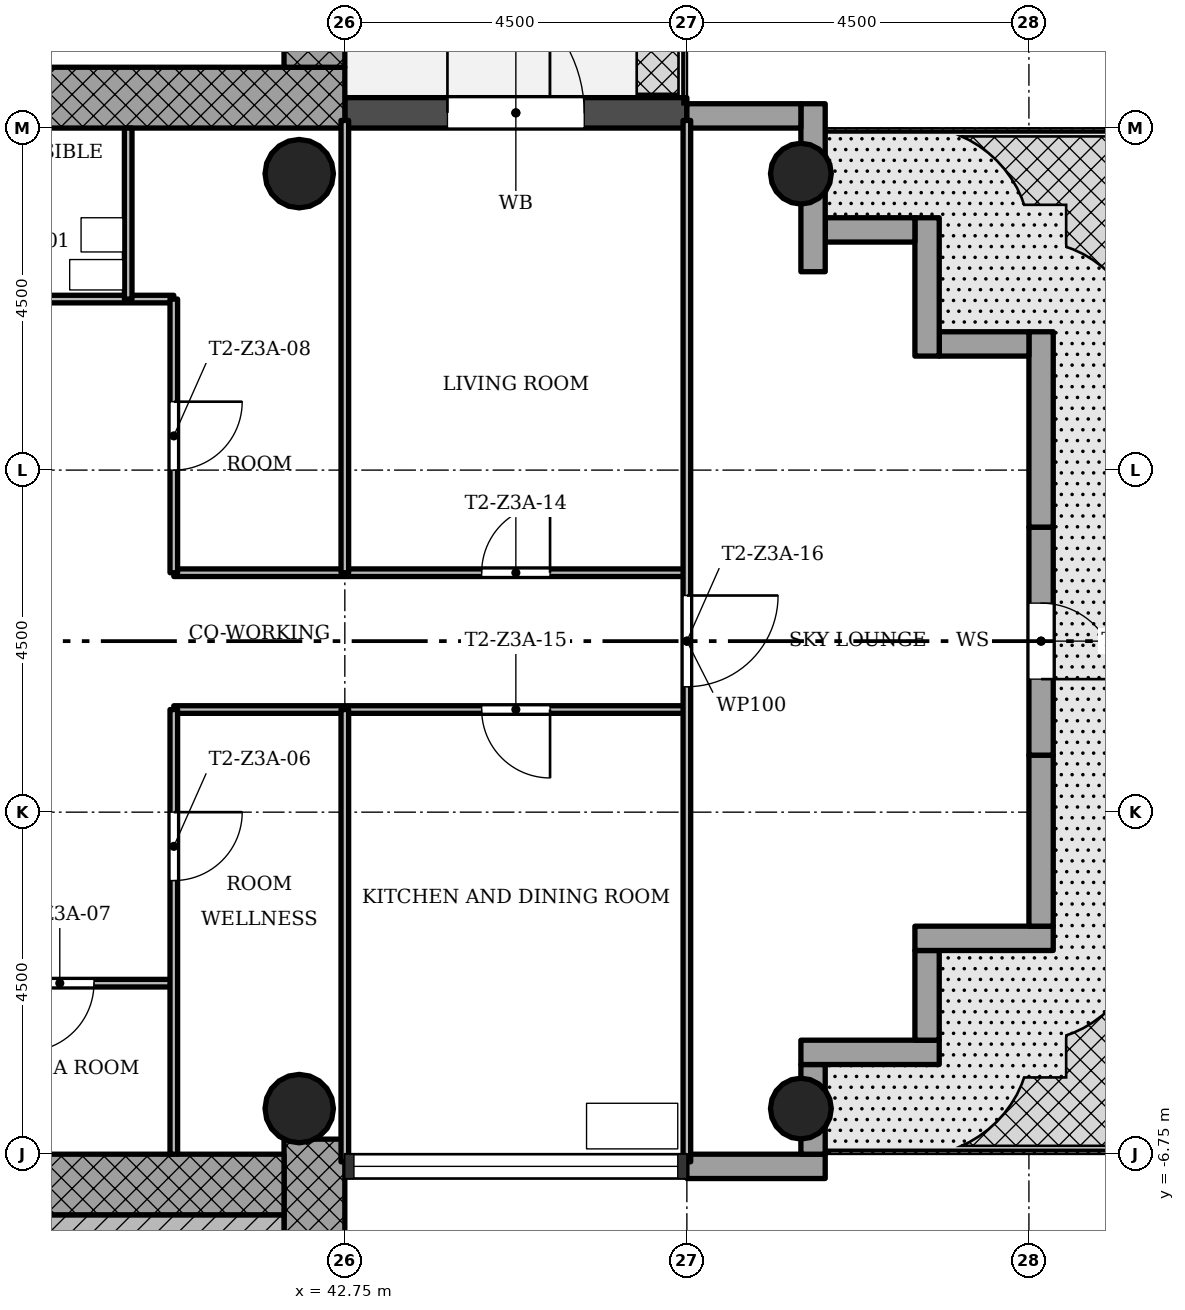
"""IFC4 building model, lengths in metres.
Left out: names, types, materials, properties, quantities, classifications, styles, units other than length and angle.
Written with IfcOpenShell. Run it as: python <this file> out.ifc"""

import sys

from ifc_helpers import new_model, si_unit, direction, frame, frame_2d, origin, origin_2d, place, context, subcontext, project, spatial, rectangle, hollow_circle, extrude, element, fill, save


model = new_model("IFC4")
c1 = context("Model", 3, precision=1e-05, world=origin(), true_north=direction((0.0, 1.0)))
c2 = subcontext(c1, "Body", "Model", "MODEL_VIEW")
j1 = project(units=[si_unit("LENGTHUNIT", "METRE"), si_unit("PLANEANGLEUNIT", "RADIAN")], contexts=[c1])
p1 = place(None, origin())
s1 = spatial("IfcSite", under=j1, at=p1, CompositionType="ELEMENT")
p2 = place(p1, origin())
s2 = spatial("IfcBuilding", under=s1, at=p2, CompositionType="ELEMENT")
p3 = place(p2, frame((0.0, 0.0, 133.7)))
s3 = spatial("IfcBuildingStorey", under=s2, at=p3, CompositionType="ELEMENT", Elevation=133.7)
p4 = place(p3, frame((30.05, 7.15, 0.0), z_axis=(0.0, 0.0, 1.0), x_axis=(1.0, 0.0, 0.0)))
e1 = element("IfcWall", 1, at=p4, inside=s3, PredefinedType="SHEAR", context=c2, shape_type="SweptSolid", body=[
    extrude(rectangle(XDim=12.7, YDim=0.8, at=frame_2d((6.35, 0.0))), origin(), (0.0, 0.0, 1.0), 3.4),
])
p5 = place(p4, frame((5.05, 0.0, 0.0)))
e2 = element("IfcOpeningElement", 2, at=p5, cuts=e1, PredefinedType="OPENING", context=c2, shape_type="SweptSolid", body=[
    extrude(rectangle(XDim=1.8, YDim=2.1, at=frame_2d((0.9, 1.05))), frame((0.0, 0.41, 0.0), z_axis=(0.0, -1.0, 0.0), x_axis=(1.0, 0.0, 0.0)), (0.0, 0.0, 1.0), 0.82),
])
p6 = place(p3, frame((42.35, 7.55, 0.0), z_axis=(0.0, 0.0, 1.0), x_axis=(0.0, 1.0, 0.0)))
e3 = element("IfcWall", 3, at=p6, inside=s3, PredefinedType="SHEAR", context=c2, shape_type="SweptSolid", body=[
    extrude(rectangle(XDim=8.2, YDim=0.8, at=frame_2d((4.1, 0.0))), origin(), (0.0, 0.0, 1.0), 3.4),
])
p7 = place(p3, frame((42.35, -14.95, 0.0), z_axis=(0.0, 0.0, 1.0), x_axis=(0.0, 1.0, 0.0)))
e4 = element("IfcWall", 4, at=p7, inside=s3, PredefinedType="SHEAR", context=c2, shape_type="SweptSolid", body=[
    extrude(rectangle(XDim=8.398, YDim=0.8, at=frame_2d((4.199, 0.0))), origin(), (0.0, 0.0, 1.0), 3.4),
])
p8 = place(p3, frame((41.95, -7.15, 0.0), z_axis=(0.0, 0.0, 1.0), x_axis=(-1.0, 0.0, 0.0)))
e5 = element("IfcWall", 5, at=p8, inside=s3, PredefinedType="SHEAR", context=c2, shape_type="SweptSolid", body=[
    extrude(rectangle(XDim=12.7, YDim=0.8, at=frame_2d((6.35, 0.0))), origin(), (0.0, 0.0, 1.0), 3.4),
])
p9 = place(p8, frame((5.05, 0.0, 0.0)))
e6 = element("IfcOpeningElement", 6, at=p9, cuts=e5, PredefinedType="OPENING", context=c2, shape_type="SweptSolid", body=[
    extrude(rectangle(XDim=1.8, YDim=2.1, at=frame_2d((0.9, 1.05))), frame((0.0, 0.41, 0.0), z_axis=(0.0, -1.0, 0.0), x_axis=(1.0, 0.0, 0.0)), (0.0, 0.0, 1.0), 0.82),
])
for number, where, z_axis, x_axis in (
    (7, (48.75, -6.15, 0.0), (0.0, 0.0, 1.0), (1.0, 0.0, 0.0)),
    (8, (48.75, 6.15, 0.0), (0.0, 0.0, 1.0), (1.0, 0.0, 0.0)),
):
    element("IfcColumn", number, at=place(p3, frame(where, z_axis=z_axis, x_axis=x_axis)), inside=s3, PredefinedType="COLUMN", context=c2, shape_type="SweptSolid", body=[
        extrude(hollow_circle(Radius=0.4, WallThickness=0.028, at=origin_2d()), origin(), (0.0, 0.0, 1.0), 3.4),
    ])
for number, where, z_axis, x_axis in (
    (9, (42.15, -6.15, 0.0), (0.0, 0.0, 1.0), (1.0, 0.0, 0.0)),
    (10, (42.15, 6.15, 0.0), (0.0, 0.0, 1.0), (1.0, 0.0, 0.0)),
):
    element("IfcColumn", number, at=place(p3, frame(where, z_axis=z_axis, x_axis=x_axis)), inside=s3, PredefinedType="COLUMN", context=c2, shape_type="SweptSolid", body=[
        extrude(hollow_circle(Radius=0.45, WallThickness=0.032, at=origin_2d()), origin(), (0.0, 0.0, 1.0), 3.4),
    ])
p10 = place(p3, frame((47.25, -6.91, 0.0), z_axis=(0.0, 0.0, 1.0), x_axis=(1.0, 0.0, 0.0)))
e11 = element("IfcWall", 11, at=p10, inside=s3, PredefinedType="STANDARD", context=c2, shape_type="SweptSolid", body=[
    extrude(rectangle(XDim=1.82, YDim=0.32, at=frame_2d((0.91, 0.0))), origin(), (0.0, 0.0, 1.0), 3.1),
])
p11 = place(p3, frame((48.91, -6.75, -0.02), z_axis=(0.0, 0.0, 1.0), x_axis=(0.0, 1.0, 0.0)))
e12 = element("IfcWall", 12, at=p11, inside=s3, PredefinedType="STANDARD", context=c2, shape_type="SweptSolid", body=[
    extrude(rectangle(XDim=1.18, YDim=0.32, at=frame_2d((0.59, 0.0))), origin(), (0.0, 0.0, 1.0), 3.12),
])
p12 = place(p3, frame((48.75, -5.41, -0.02), z_axis=(0.0, 0.0, 1.0), x_axis=(1.0, 0.0, 0.0)))
e13 = element("IfcWall", 13, at=p12, inside=s3, PredefinedType="STANDARD", context=c2, shape_type="SweptSolid", body=[
    extrude(rectangle(XDim=1.82, YDim=0.32, at=frame_2d((0.91, 0.0))), origin(), (0.0, 0.0, 1.0), 3.12),
])
p13 = place(p3, frame((50.41, -5.25, -0.02), z_axis=(0.0, 0.0, 1.0), x_axis=(0.0, 1.0, 0.0)))
e14 = element("IfcWall", 14, at=p13, inside=s3, PredefinedType="STANDARD", context=c2, shape_type="SweptSolid", body=[
    extrude(rectangle(XDim=1.18, YDim=0.32, at=frame_2d((0.59, 0.0))), origin(), (0.0, 0.0, 1.0), 3.12),
])
p14 = place(p3, frame((50.25, -3.91, -0.02), z_axis=(0.0, 0.0, 1.0), x_axis=(1.0, 0.0, 0.0)))
e15 = element("IfcWall", 15, at=p14, inside=s3, PredefinedType="STANDARD", context=c2, shape_type="SweptSolid", body=[
    extrude(rectangle(XDim=1.82, YDim=0.32, at=frame_2d((0.91, 0.0))), origin(), (0.0, 0.0, 1.0), 3.12),
])
p15 = place(p3, frame((51.91, -3.75, -0.02), z_axis=(0.0, 0.0, 1.0), x_axis=(0.0, 1.0, 0.0)))
e16 = element("IfcWall", 16, at=p15, inside=s3, PredefinedType="STANDARD", context=c2, shape_type="SweptSolid", body=[
    extrude(rectangle(XDim=2.25, YDim=0.32, at=frame_2d((1.125, 0.0))), origin(), (0.0, 0.0, 1.0), 3.12),
])
p16 = place(p3, frame((51.91, -1.5, -0.02), z_axis=(0.0, 0.0, 1.0), x_axis=(0.0, 1.0, 0.0)))
e17 = element("IfcWall", 17, at=p16, inside=s3, PredefinedType="STANDARD", context=c2, shape_type="SweptSolid", body=[
    extrude(rectangle(XDim=3.0, YDim=0.32, at=frame_2d((1.5, 0.0))), origin(), (0.0, 0.0, 1.0), 3.12),
])
p17 = place(p16, frame((1.0, 0.0, 0.02)))
e18 = element("IfcOpeningElement", 18, at=p17, cuts=e17, PredefinedType="OPENING", context=c2, shape_type="SweptSolid", body=[
    extrude(rectangle(XDim=1.0, YDim=2.1, at=frame_2d((0.5, 1.05))), frame((0.0, 0.17, 0.0), z_axis=(0.0, -1.0, 0.0), x_axis=(1.0, 0.0, 0.0)), (0.0, 0.0, 1.0), 0.34),
])
p18 = place(p3, frame((51.91, 1.5, -0.02), z_axis=(0.0, 0.0, 1.0), x_axis=(0.0, 1.0, 0.0)))
e19 = element("IfcWall", 19, at=p18, inside=s3, PredefinedType="STANDARD", context=c2, shape_type="SweptSolid", body=[
    extrude(rectangle(XDim=2.57, YDim=0.32, at=frame_2d((1.285, 0.0))), origin(), (0.0, 0.0, 1.0), 3.12),
])
p19 = place(p3, frame((51.75, 3.91, -0.02), z_axis=(0.0, 0.0, 1.0), x_axis=(-1.0, 0.0, 0.0)))
e20 = element("IfcWall", 20, at=p19, inside=s3, PredefinedType="STANDARD", context=c2, shape_type="SweptSolid", body=[
    extrude(rectangle(XDim=1.18, YDim=0.32, at=frame_2d((0.59, 0.0))), origin(), (0.0, 0.0, 1.0), 3.12),
])
p20 = place(p3, frame((50.41, 3.75, -0.02), z_axis=(0.0, 0.0, 1.0), x_axis=(0.0, 1.0, 0.0)))
e21 = element("IfcWall", 21, at=p20, inside=s3, PredefinedType="STANDARD", context=c2, shape_type="SweptSolid", body=[
    extrude(rectangle(XDim=1.82, YDim=0.32, at=frame_2d((0.91, 0.0))), origin(), (0.0, 0.0, 1.0), 3.12),
])
p21 = place(p3, frame((50.25, 5.41, -0.02), z_axis=(0.0, 0.0, 1.0), x_axis=(-1.0, 0.0, 0.0)))
e22 = element("IfcWall", 22, at=p21, inside=s3, PredefinedType="STANDARD", context=c2, shape_type="SweptSolid", body=[
    extrude(rectangle(XDim=1.18, YDim=0.32, at=frame_2d((0.59, 0.0))), origin(), (0.0, 0.0, 1.0), 3.12),
])
p22 = place(p3, frame((48.91, 4.86, -0.02), z_axis=(0.0, 0.0, 1.0), x_axis=(0.0, 1.0, 0.0)))
e23 = element("IfcWall", 23, at=p22, inside=s3, PredefinedType="STANDARD", context=c2, shape_type="SweptSolid", body=[
    extrude(rectangle(XDim=2.21, YDim=0.32, at=frame_2d((1.105, 0.0))), origin(), (0.0, 0.0, 1.0), 3.12),
])
p23 = place(p3, frame((48.75, 6.91, 0.0), z_axis=(0.0, 0.0, 1.0), x_axis=(-1.0, 0.0, 0.0)))
e24 = element("IfcWall", 24, at=p23, inside=s3, PredefinedType="STANDARD", context=c2, shape_type="SweptSolid", body=[
    extrude(rectangle(XDim=1.5, YDim=0.32, at=frame_2d((0.75, 0.0))), origin(), (0.0, 0.0, 1.0), 3.1),
])
p24 = place(p3, frame((47.25, 6.95, -0.02), z_axis=(0.0, 0.0, 1.0), x_axis=(-1.0, 0.0, 0.0)))
e25 = element("IfcWall", 25, at=p24, inside=s3, PredefinedType="STANDARD", context=c2, shape_type="SweptSolid", body=[
    extrude(rectangle(XDim=4.5, YDim=0.4, at=frame_2d((2.25, 0.0))), origin(), (0.0, 0.0, 1.0), 3.12),
])
p25 = place(p24, frame((1.35, 0.0, 0.02)))
e26 = element("IfcOpeningElement", 26, at=p25, cuts=e25, PredefinedType="OPENING", context=c2, shape_type="SweptSolid", body=[
    extrude(rectangle(XDim=1.8, YDim=2.1, at=frame_2d((0.9, 1.05))), frame((0.0, 0.21, 0.0), z_axis=(0.0, -1.0, 0.0), x_axis=(1.0, 0.0, 0.0)), (0.0, 0.0, 1.0), 0.42),
])
p26 = place(p3, frame((40.5, -4.5, 0.0), z_axis=(0.0, 0.0, 1.0), x_axis=(-1.0, 0.0, 0.0)))
e27 = element("IfcWall", 27, at=p26, inside=s3, PredefinedType="PARTITIONING", context=c2, shape_type="SweptSolid", body=[
    extrude(rectangle(XDim=3.0, YDim=0.1, at=frame_2d((1.5, 0.0))), origin(), (0.0, 0.0, 1.0), 3.0),
])
p27 = place(p26, frame((1.05, 0.0, 0.0)))
e28 = element("IfcOpeningElement", 28, at=p27, cuts=e27, PredefinedType="OPENING", context=c2, shape_type="SweptSolid", body=[
    extrude(rectangle(XDim=0.9, YDim=2.1, at=frame_2d((0.45, 1.05))), frame((0.0, 0.06, 0.0), z_axis=(0.0, -1.0, 0.0), x_axis=(1.0, 0.0, 0.0)), (0.0, 0.0, 1.0), 0.12),
])
p28 = place(p3, frame((47.25, -0.9, 0.0), z_axis=(0.0, 0.0, 1.0), x_axis=(-1.0, 0.0, 0.0)))
e29 = element("IfcWall", 29, at=p28, inside=s3, PredefinedType="PARTITIONING", context=c2, shape_type="SweptSolid", body=[
    extrude(rectangle(XDim=6.75, YDim=0.1, at=frame_2d((3.375, 0.0))), origin(), (0.0, 0.0, 1.0), 3.0),
])
p29 = place(p28, frame((1.8, 0.0, 0.0)))
e30 = element("IfcOpeningElement", 30, at=p29, cuts=e29, PredefinedType="OPENING", context=c2, shape_type="SweptSolid", body=[
    extrude(rectangle(XDim=0.9, YDim=2.1, at=frame_2d((0.45, 1.05))), frame((0.0, 0.06, 0.0), z_axis=(0.0, -1.0, 0.0), x_axis=(1.0, 0.0, 0.0)), (0.0, 0.0, 1.0), 0.12),
])
p30 = place(p3, frame((47.25, 0.9, 0.0), z_axis=(0.0, 0.0, 1.0), x_axis=(-1.0, 0.0, 0.0)))
e31 = element("IfcWall", 31, at=p30, inside=s3, PredefinedType="PARTITIONING", context=c2, shape_type="SweptSolid", body=[
    extrude(rectangle(XDim=6.75, YDim=0.1, at=frame_2d((3.375, 0.0))), origin(), (0.0, 0.0, 1.0), 3.0),
])
p31 = place(p30, frame((1.8, 0.0, 0.0)))
e32 = element("IfcOpeningElement", 32, at=p31, cuts=e31, PredefinedType="OPENING", context=c2, shape_type="SweptSolid", body=[
    extrude(rectangle(XDim=0.9, YDim=2.1, at=frame_2d((0.45, 1.05))), frame((0.0, 0.06, 0.0), z_axis=(0.0, -1.0, 0.0), x_axis=(1.0, 0.0, 0.0)), (0.0, 0.0, 1.0), 0.12),
])
p32 = place(p3, frame((40.5, 4.5, 0.0), z_axis=(0.0, 0.0, 1.0), x_axis=(-1.0, 0.0, 0.0)))
e33 = element("IfcWall", 33, at=p32, inside=s3, PredefinedType="PARTITIONING", context=c2, shape_type="SweptSolid", body=[
    extrude(rectangle(XDim=3.0, YDim=0.1, at=frame_2d((1.5, 0.0))), origin(), (0.0, 0.0, 1.0), 3.0),
])
p33 = place(p3, frame((47.25, -6.85, 0.0), z_axis=(0.0, 0.0, 1.0), x_axis=(0.0, 1.0, 0.0)))
e34 = element("IfcWall", 34, at=p33, inside=s3, PredefinedType="PARTITIONING", context=c2, shape_type="SweptSolid", body=[
    extrude(rectangle(XDim=13.7, YDim=0.1, at=frame_2d((6.85, 0.0))), origin(), (0.0, 0.0, 1.0), 3.0),
])
p34 = place(p33, frame((6.25, 0.0, 0.0)))
e35 = element("IfcOpeningElement", 35, at=p34, cuts=e34, PredefinedType="OPENING", context=c2, shape_type="SweptSolid", body=[
    extrude(rectangle(XDim=1.2, YDim=2.1, at=frame_2d((0.6, 1.05))), frame((0.0, 0.06, 0.0), z_axis=(0.0, -1.0, 0.0), x_axis=(1.0, 0.0, 0.0)), (0.0, 0.0, 1.0), 0.12),
])
for number, where, z_axis, x_axis in (
    (36, (42.75, -6.85, 0.0), (0.0, 0.0, 1.0), (0.0, 1.0, 0.0)),
    (37, (42.75, 0.9, 0.0), (0.0, 0.0, 1.0), (0.0, 1.0, 0.0)),
):
    element("IfcWall", number, at=place(p3, frame(where, z_axis=z_axis, x_axis=x_axis)), inside=s3, PredefinedType="PARTITIONING", context=c2, shape_type="SweptSolid", body=[
        extrude(rectangle(XDim=5.95, YDim=0.1, at=frame_2d((2.975, 0.0))), origin(), (0.0, 0.0, 1.0), 3.0),
    ])
p35 = place(p3, frame((40.5, -6.75, 0.0), z_axis=(0.0, 0.0, 1.0), x_axis=(0.0, 1.0, 0.0)))
e38 = element("IfcWall", 38, at=p35, inside=s3, PredefinedType="PARTITIONING", context=c2, shape_type="SweptSolid", body=[
    extrude(rectangle(XDim=5.85, YDim=0.1, at=frame_2d((2.925, 0.0))), origin(), (0.0, 0.0, 1.0), 3.0),
])
p36 = place(p35, frame((3.6, 0.0, 0.0)))
e39 = element("IfcOpeningElement", 39, at=p36, cuts=e38, PredefinedType="OPENING", context=c2, shape_type="SweptSolid", body=[
    extrude(rectangle(XDim=0.9, YDim=2.1, at=frame_2d((0.45, 1.05))), frame((0.0, 0.06, 0.0), z_axis=(0.0, -1.0, 0.0), x_axis=(1.0, 0.0, 0.0)), (0.0, 0.0, 1.0), 0.12),
])
p37 = place(p3, frame((40.5, 0.9, 0.0), z_axis=(0.0, 0.0, 1.0), x_axis=(0.0, 1.0, 0.0)))
e40 = element("IfcWall", 40, at=p37, inside=s3, PredefinedType="PARTITIONING", context=c2, shape_type="SweptSolid", body=[
    extrude(rectangle(XDim=3.6, YDim=0.1, at=frame_2d((1.8, 0.0))), origin(), (0.0, 0.0, 1.0), 3.0),
])
p38 = place(p37, frame((1.35, 0.0, 0.0)))
e41 = element("IfcOpeningElement", 41, at=p38, cuts=e40, PredefinedType="OPENING", context=c2, shape_type="SweptSolid", body=[
    extrude(rectangle(XDim=0.9, YDim=2.1, at=frame_2d((0.45, 1.05))), frame((0.0, 0.06, 0.0), z_axis=(0.0, -1.0, 0.0), x_axis=(1.0, 0.0, 0.0)), (0.0, 0.0, 1.0), 0.12),
])
p39 = place(p3, frame((39.9, 4.5, 0.0), z_axis=(0.0, 0.0, 1.0), x_axis=(0.0, 1.0, 0.0)))
e42 = element("IfcWall", 42, at=p39, inside=s3, PredefinedType="PARTITIONING", context=c2, shape_type="SweptSolid", body=[
    extrude(rectangle(XDim=2.25, YDim=0.1, at=frame_2d((1.125, 0.0))), origin(), (0.0, 0.0, 1.0), 3.0),
])
p40 = place(p3, frame((37.85, -7.75, 0.0), z_axis=(0.0, 0.0, 1.0), x_axis=(1.0, 0.0, 0.0)))
e43 = element("IfcWall", 43, at=p40, inside=s3, PredefinedType="SHEAR", context=c2, shape_type="SweptSolid", body=[
    extrude(rectangle(XDim=4.1, YDim=0.4, at=frame_2d((2.05, 0.0))), origin(), (0.0, 0.0, 1.0), 3.4),
])
p41 = place(p17, origin())
e44 = element("IfcDoor", 44, at=p41, inside=s3, OperationType="SINGLE_SWING_LEFT", PredefinedType="DOOR", context=c2, shape_type="SweptSolid", body=[
    extrude(rectangle(XDim=1.0, YDim=2.1, at=frame_2d((0.5, 1.05))), frame((0.0, 0.025, 0.0), z_axis=(0.0, -1.0, 0.0), x_axis=(1.0, 0.0, 0.0)), (0.0, 0.0, 1.0), 0.05),
])
fill(e18, e44)
p42 = place(p25, origin())
e45 = element("IfcDoor", 45, at=p42, inside=s3, OperationType="SINGLE_SWING_RIGHT", PredefinedType="DOOR", context=c2, shape_type="SweptSolid", body=[
    extrude(rectangle(XDim=1.8, YDim=2.1, at=frame_2d((0.9, 1.05))), frame((0.0, 0.025, 0.0), z_axis=(0.0, -1.0, 0.0), x_axis=(1.0, 0.0, 0.0)), (0.0, 0.0, 1.0), 0.05),
])
fill(e26, e45)
p43 = place(p36, origin())
e46 = element("IfcDoor", 46, at=p43, inside=s3, OperationType="SINGLE_SWING_RIGHT", PredefinedType="DOOR", context=c2, shape_type="SweptSolid", body=[
    extrude(rectangle(XDim=0.9, YDim=2.1, at=frame_2d((0.45, 1.05))), frame((0.0, 0.025, 0.0), z_axis=(0.0, -1.0, 0.0), x_axis=(1.0, 0.0, 0.0)), (0.0, 0.0, 1.0), 0.05),
])
fill(e39, e46)
p44 = place(p27, origin())
e47 = element("IfcDoor", 47, at=p44, inside=s3, OperationType="SINGLE_SWING_LEFT", PredefinedType="DOOR", context=c2, shape_type="SweptSolid", body=[
    extrude(rectangle(XDim=0.9, YDim=2.1, at=frame_2d((0.45, 1.05))), frame((0.0, 0.025, 0.0), z_axis=(0.0, -1.0, 0.0), x_axis=(1.0, 0.0, 0.0)), (0.0, 0.0, 1.0), 0.05),
])
fill(e28, e47)
p45 = place(p38, origin())
e48 = element("IfcDoor", 48, at=p45, inside=s3, OperationType="SINGLE_SWING_RIGHT", PredefinedType="DOOR", context=c2, shape_type="SweptSolid", body=[
    extrude(rectangle(XDim=0.9, YDim=2.1, at=frame_2d((0.45, 1.05))), frame((0.0, 0.025, 0.0), z_axis=(0.0, -1.0, 0.0), x_axis=(1.0, 0.0, 0.0)), (0.0, 0.0, 1.0), 0.05),
])
fill(e41, e48)
p46 = place(p31, origin())
e49 = element("IfcDoor", 49, at=p46, inside=s3, OperationType="SINGLE_SWING_LEFT", PredefinedType="DOOR", context=c2, shape_type="SweptSolid", body=[
    extrude(rectangle(XDim=0.9, YDim=2.1, at=frame_2d((0.45, 1.05))), frame((0.0, 0.025, 0.0), z_axis=(0.0, -1.0, 0.0), x_axis=(1.0, 0.0, 0.0)), (0.0, 0.0, 1.0), 0.05),
])
fill(e32, e49)
p47 = place(p29, origin())
e50 = element("IfcDoor", 50, at=p47, inside=s3, OperationType="SINGLE_SWING_RIGHT", PredefinedType="DOOR", context=c2, shape_type="SweptSolid", body=[
    extrude(rectangle(XDim=0.9, YDim=2.1, at=frame_2d((0.45, 1.05))), frame((0.0, 0.025, 0.0), z_axis=(0.0, -1.0, 0.0), x_axis=(1.0, 0.0, 0.0)), (0.0, 0.0, 1.0), 0.05),
])
fill(e30, e50)
p48 = place(p34, origin())
e51 = element("IfcDoor", 51, at=p48, inside=s3, OperationType="SINGLE_SWING_RIGHT", PredefinedType="DOOR", context=c2, shape_type="SweptSolid", body=[
    extrude(rectangle(XDim=1.2, YDim=2.1, at=frame_2d((0.6, 1.05))), frame((0.0, 0.025, 0.0), z_axis=(0.0, -1.0, 0.0), x_axis=(1.0, 0.0, 0.0)), (0.0, 0.0, 1.0), 0.05),
])
fill(e35, e51)
save(model, sys.argv[1])
